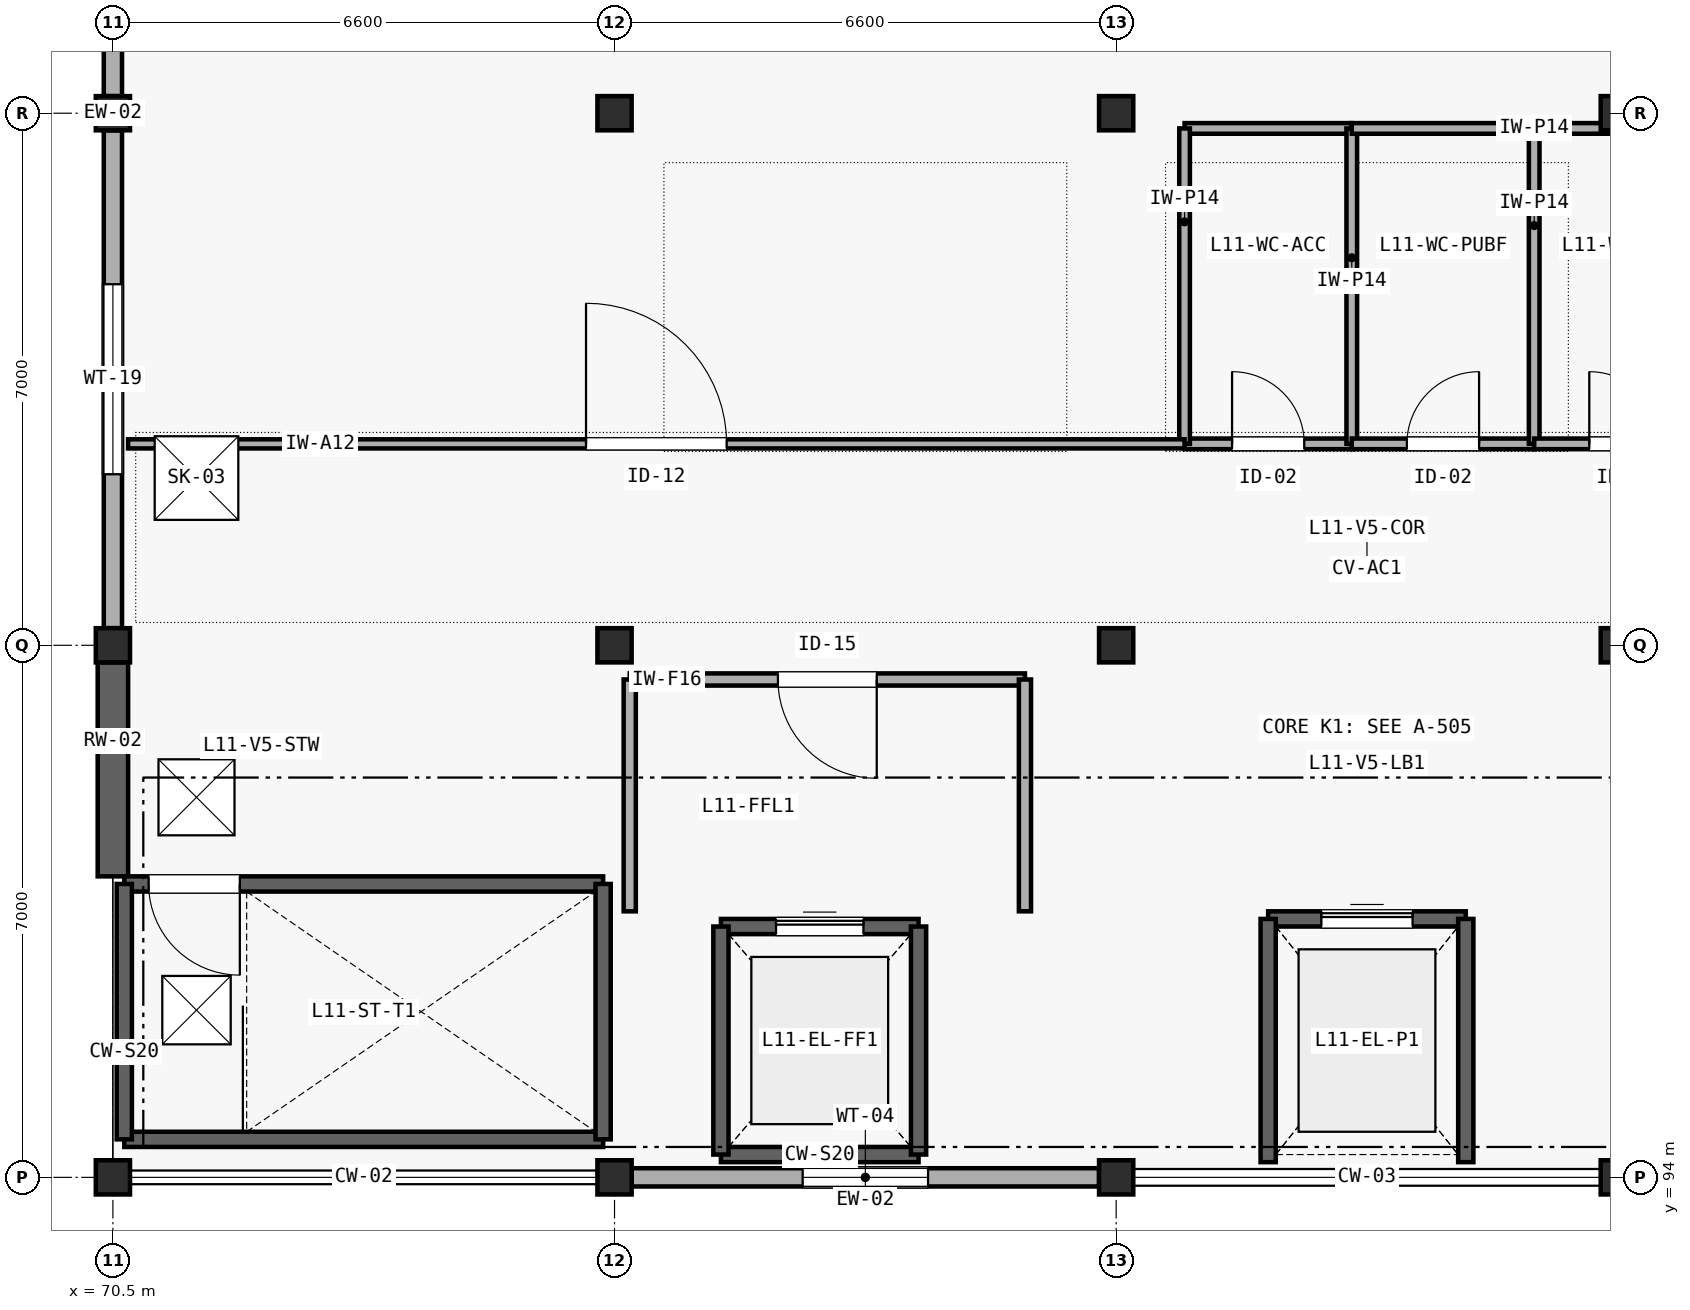
"""IFC4 building model, lengths in metres.
Left out: names, types, materials, properties, quantities, classifications, styles, units other than length and angle.
Written with IfcOpenShell. Run it as: python <this file> out.ifc"""

import sys

from ifc_helpers import new_model, si_unit, direction, frame, frame_2d, origin, origin_2d, place, context, subcontext, project, spatial, rectangle, extrude, element, fill, save


model = new_model("IFC4")
c1 = context("Model", 3, precision=1e-05, world=origin(), true_north=direction((0.0, 1.0)))
c2 = subcontext(c1, "Body", "Model", "MODEL_VIEW")
j1 = project(units=[si_unit("LENGTHUNIT", "METRE"), si_unit("PLANEANGLEUNIT", "RADIAN")], contexts=[c1])
p1 = place(None, origin())
s1 = spatial("IfcSite", under=j1, at=p1, CompositionType="ELEMENT")
p2 = place(p1, origin())
s2 = spatial("IfcBuilding", under=s1, at=p2, CompositionType="ELEMENT")
p3 = place(p2, frame((0.0, 0.0, 46.2)))
s3 = spatial("IfcBuildingStorey", under=s2, at=p3, CompositionType="ELEMENT", Elevation=46.2)
for number, where, z_axis, x_axis in (
    (1, (70.5, 94.0, 0.0), (0.0, 0.0, 1.0), (1.0, 0.0, 0.0)),
    (2, (70.5, 101.0, 0.0), (0.0, 0.0, 1.0), (1.0, 0.0, 0.0)),
    (3, (70.5, 108.0, 0.0), (0.0, 0.0, 1.0), (1.0, 0.0, 0.0)),
    (4, (77.1, 94.0, 0.0), (0.0, 0.0, 1.0), (1.0, 0.0, 0.0)),
    (5, (77.1, 101.0, 0.0), (0.0, 0.0, 1.0), (1.0, 0.0, 0.0)),
    (6, (77.1, 108.0, 0.0), (0.0, 0.0, 1.0), (1.0, 0.0, 0.0)),
    (7, (83.7, 94.0, 0.0), (0.0, 0.0, 1.0), (1.0, 0.0, 0.0)),
    (8, (83.7, 101.0, 0.0), (0.0, 0.0, 1.0), (1.0, 0.0, 0.0)),
    (9, (83.7, 108.0, 0.0), (0.0, 0.0, 1.0), (1.0, 0.0, 0.0)),
    (10, (90.3, 94.0, 0.0), (0.0, 0.0, 1.0), (1.0, 0.0, 0.0)),
    (11, (90.3, 101.0, 0.0), (0.0, 0.0, 1.0), (1.0, 0.0, 0.0)),
    (12, (90.3, 108.0, 0.0), (0.0, 0.0, 1.0), (1.0, 0.0, 0.0)),
):
    element("IfcColumn", number, at=place(p3, frame(where, z_axis=z_axis, x_axis=x_axis)), inside=s3, PredefinedType="COLUMN", context=c2, shape_type="SweptSolid", body=[
        extrude(rectangle(XDim=0.45, YDim=0.45, at=origin_2d()), origin(), (0.0, 0.0, 1.0), 4.2),
    ])
p4 = place(p3, frame((77.325, 94.0, 0.0), z_axis=(0.0, 0.0, 1.0), x_axis=(1.0, 0.0, 0.0)))
e13 = element("IfcWall", 13, at=p4, inside=s3, PredefinedType="SOLIDWALL", context=c2, shape_type="SweptSolid", body=[
    extrude(rectangle(XDim=6.15, YDim=0.24, at=frame_2d((3.075, 0.0))), origin(), (0.0, 0.0, 1.0), 3.345),
])
p5 = place(p4, frame((2.25, 0.0, 0.85)))
e14 = element("IfcOpeningElement", 14, at=p5, cuts=e13, PredefinedType="OPENING", context=c2, shape_type="SweptSolid", body=[
    extrude(rectangle(XDim=1.65, YDim=1.35, at=frame_2d((0.825, 0.675))), frame((0.0, 0.13, 0.0), z_axis=(0.0, -1.0, 0.0), x_axis=(1.0, 0.0, 0.0)), (0.0, 0.0, 1.0), 0.26),
])
p6 = place(p3, frame((70.5, 97.96, 0.0), z_axis=(0.0, 0.0, 1.0), x_axis=(0.0, 1.0, 0.0)))
e15 = element("IfcWall", 15, at=p6, inside=s3, PredefinedType="SHEAR", context=c2, shape_type="SweptSolid", body=[
    extrude(rectangle(XDim=2.815, YDim=0.4, at=frame_2d((1.407, 0.0))), origin(), (0.0, 0.0, 1.0), 3.85),
])
p7 = place(p3, frame((70.5, 101.225, 0.0), z_axis=(0.0, 0.0, 1.0), x_axis=(0.0, 1.0, 0.0)))
e16 = element("IfcWall", 16, at=p7, inside=s3, PredefinedType="SOLIDWALL", context=c2, shape_type="SweptSolid", body=[
    extrude(rectangle(XDim=6.55, YDim=0.24, at=frame_2d((3.275, 0.0))), origin(), (0.0, 0.0, 1.0), 3.313),
])
p8 = place(p7, frame((2.025, 0.0, 0.85)))
e17 = element("IfcOpeningElement", 17, at=p8, cuts=e16, PredefinedType="OPENING", context=c2, shape_type="SweptSolid", body=[
    extrude(rectangle(XDim=2.5, YDim=1.25, at=frame_2d((1.25, 0.625))), frame((0.0, 0.13, 0.0), z_axis=(0.0, -1.0, 0.0), x_axis=(1.0, 0.0, 0.0)), (0.0, 0.0, 1.0), 0.26),
])
p9 = place(p3, frame((70.5, 108.225, 0.0), z_axis=(0.0, 0.0, 1.0), x_axis=(0.0, 1.0, 0.0)))
e18 = element("IfcWall", 18, at=p9, inside=s3, PredefinedType="SOLIDWALL", context=c2, shape_type="SweptSolid", body=[
    extrude(rectangle(XDim=6.55, YDim=0.24, at=frame_2d((3.275, 0.0))), origin(), (0.0, 0.0, 1.0), 3.381),
])
p10 = place(p9, frame((2.375, 0.0, 0.85)))
e19 = element("IfcOpeningElement", 19, at=p10, cuts=e18, PredefinedType="OPENING", context=c2, shape_type="SweptSolid", body=[
    extrude(rectangle(XDim=1.8, YDim=1.6, at=frame_2d((0.9, 0.8))), frame((0.0, 0.13, 0.0), z_axis=(0.0, -1.0, 0.0), x_axis=(1.0, 0.0, 0.0)), (0.0, 0.0, 1.0), 0.26),
])
p11 = place(p3, frame((70.65, 94.5, 0.0), z_axis=(0.0, 0.0, 1.0), x_axis=(1.0, 0.0, 0.0)))
e20 = element("IfcWall", 20, at=p11, inside=s3, PredefinedType="SHEAR", context=c2, shape_type="SweptSolid", body=[
    extrude(rectangle(XDim=6.3, YDim=0.2, at=frame_2d((3.15, 0.0))), origin(), (0.0, 0.0, 1.0), 4.2),
])
p12 = place(p3, frame((70.65, 97.86, 0.0), z_axis=(0.0, 0.0, 1.0), x_axis=(1.0, 0.0, 0.0)))
e21 = element("IfcWall", 21, at=p12, inside=s3, PredefinedType="SHEAR", context=c2, shape_type="SweptSolid", body=[
    extrude(rectangle(XDim=6.3, YDim=0.2, at=frame_2d((3.15, 0.0))), origin(), (0.0, 0.0, 1.0), 4.2),
])
p13 = place(p12, frame((0.32, 0.0, 0.0)))
e22 = element("IfcOpeningElement", 22, at=p13, cuts=e21, PredefinedType="OPENING", context=c2, shape_type="SweptSolid", body=[
    extrude(rectangle(XDim=1.2, YDim=2.15, at=frame_2d((0.6, 1.075))), frame((0.0, 0.11, 0.0), z_axis=(0.0, -1.0, 0.0), x_axis=(1.0, 0.0, 0.0)), (0.0, 0.0, 1.0), 0.22),
])
for number, where, z_axis, x_axis in (
    (23, (70.65, 94.5, 0.0), (0.0, 0.0, 1.0), (0.0, 1.0, 0.0)),
    (24, (76.95, 94.5, 0.0), (0.0, 0.0, 1.0), (0.0, 1.0, 0.0)),
):
    element("IfcWall", number, at=place(p3, frame(where, z_axis=z_axis, x_axis=x_axis)), inside=s3, PredefinedType="SHEAR", context=c2, shape_type="SweptSolid", body=[
        extrude(rectangle(XDim=3.36, YDim=0.2, at=frame_2d((1.68, 0.0))), origin(), (0.0, 0.0, 1.0), 4.2),
    ])
p14 = place(p3, frame((78.5, 94.3, 0.0), z_axis=(0.0, 0.0, 1.0), x_axis=(1.0, 0.0, 0.0)))
e25 = element("IfcWall", 25, at=p14, inside=s3, PredefinedType="SHEAR", context=c2, shape_type="SweptSolid", body=[
    extrude(rectangle(XDim=2.6, YDim=0.2, at=frame_2d((1.3, 0.0))), origin(), (0.0, 0.0, 1.0), 4.2),
])
p15 = place(p3, frame((78.5, 97.3, 0.0), z_axis=(0.0, 0.0, 1.0), x_axis=(1.0, 0.0, 0.0)))
e26 = element("IfcWall", 26, at=p15, inside=s3, PredefinedType="SHEAR", context=c2, shape_type="SweptSolid", body=[
    extrude(rectangle(XDim=2.6, YDim=0.2, at=frame_2d((1.3, 0.0))), origin(), (0.0, 0.0, 1.0), 4.2),
])
p16 = place(p15, frame((0.725, 0.0, 0.0)))
e27 = element("IfcOpeningElement", 27, at=p16, cuts=e26, PredefinedType="OPENING", context=c2, shape_type="SweptSolid", body=[
    extrude(rectangle(XDim=1.15, YDim=2.2, at=frame_2d((0.575, 1.1))), frame((0.0, 0.11, 0.0), z_axis=(0.0, -1.0, 0.0), x_axis=(1.0, 0.0, 0.0)), (0.0, 0.0, 1.0), 0.22),
])
for number, where, z_axis, x_axis in (
    (28, (78.5, 94.3, 0.0), (0.0, 0.0, 1.0), (0.0, 1.0, 0.0)),
    (29, (81.1, 94.3, 0.0), (0.0, 0.0, 1.0), (0.0, 1.0, 0.0)),
):
    element("IfcWall", number, at=place(p3, frame(where, z_axis=z_axis, x_axis=x_axis)), inside=s3, PredefinedType="SHEAR", context=c2, shape_type="SweptSolid", body=[
        extrude(rectangle(XDim=3.0, YDim=0.2, at=frame_2d((1.5, 0.0))), origin(), (0.0, 0.0, 1.0), 4.2),
    ])
p17 = place(p3, frame((85.7, 97.4, 0.0), z_axis=(0.0, 0.0, 1.0), x_axis=(1.0, 0.0, 0.0)))
e30 = element("IfcWall", 30, at=p17, inside=s3, PredefinedType="SHEAR", context=c2, shape_type="SweptSolid", body=[
    extrude(rectangle(XDim=2.6, YDim=0.2, at=frame_2d((1.3, 0.0))), origin(), (0.0, 0.0, 1.0), 4.2),
])
p18 = place(p17, frame((0.7, 0.0, 0.0)))
e31 = element("IfcOpeningElement", 31, at=p18, cuts=e30, PredefinedType="OPENING", context=c2, shape_type="SweptSolid", body=[
    extrude(rectangle(XDim=1.2, YDim=2.2, at=frame_2d((0.6, 1.1))), frame((0.0, 0.11, 0.0), z_axis=(0.0, -1.0, 0.0), x_axis=(1.0, 0.0, 0.0)), (0.0, 0.0, 1.0), 0.22),
])
for number, where, z_axis, x_axis in (
    (32, (85.7, 94.2, 0.0), (0.0, 0.0, 1.0), (0.0, 1.0, 0.0)),
    (33, (88.3, 94.2, 0.0), (0.0, 0.0, 1.0), (0.0, 1.0, 0.0)),
):
    element("IfcWall", number, at=place(p3, frame(where, z_axis=z_axis, x_axis=x_axis)), inside=s3, PredefinedType="SHEAR", context=c2, shape_type="SweptSolid", body=[
        extrude(rectangle(XDim=3.2, YDim=0.2, at=frame_2d((1.6, 0.0))), origin(), (0.0, 0.0, 1.0), 4.2),
    ])
p19 = place(p3, frame((77.3, 100.55, 0.0), z_axis=(0.0, 0.0, 1.0), x_axis=(1.0, 0.0, 0.0)))
e34 = element("IfcWall", 34, at=p19, inside=s3, PredefinedType="SOLIDWALL", context=c2, shape_type="SweptSolid", body=[
    extrude(rectangle(XDim=5.2, YDim=0.16, at=frame_2d((2.6, 0.0))), origin(), (0.0, 0.0, 1.0), 3.9),
])
p20 = place(p19, frame((1.95, 0.0, 0.0)))
e35 = element("IfcOpeningElement", 35, at=p20, cuts=e34, PredefinedType="OPENING", context=c2, shape_type="SweptSolid", body=[
    extrude(rectangle(XDim=1.3, YDim=2.15, at=frame_2d((0.65, 1.075))), frame((0.0, 0.09, 0.0), z_axis=(0.0, -1.0, 0.0), x_axis=(1.0, 0.0, 0.0)), (0.0, 0.0, 1.0), 0.18),
])
p21 = place(p3, frame((77.3, 97.5, 0.0), z_axis=(0.0, 0.0, 1.0), x_axis=(0.0, 1.0, 0.0)))
e36 = element("IfcWall", 36, at=p21, inside=s3, PredefinedType="SOLIDWALL", context=c2, shape_type="SweptSolid", body=[
    extrude(rectangle(XDim=3.05, YDim=0.16, at=frame_2d((1.525, 0.0))), origin(), (0.0, 0.0, 1.0), 3.405),
])
p22 = place(p3, frame((82.5, 97.5, 0.0), z_axis=(0.0, 0.0, 1.0), x_axis=(0.0, 1.0, 0.0)))
e37 = element("IfcWall", 37, at=p22, inside=s3, PredefinedType="SOLIDWALL", context=c2, shape_type="SweptSolid", body=[
    extrude(rectangle(XDim=3.05, YDim=0.16, at=frame_2d((1.525, 0.0))), origin(), (0.0, 0.0, 1.0), 3.9),
])
p23 = place(p3, frame((84.6, 103.65, 0.0), z_axis=(0.0, 0.0, 1.0), x_axis=(1.0, 0.0, 0.0)))
e38 = element("IfcWall", 38, at=p23, inside=s3, PredefinedType="PLUMBINGWALL", context=c2, shape_type="SweptSolid", body=[
    extrude(rectangle(XDim=2.2, YDim=0.14, at=frame_2d((1.1, 0.0))), origin(), (0.0, 0.0, 1.0), 3.9),
])
p24 = place(p23, frame((0.625, 0.0, 0.0)))
e39 = element("IfcOpeningElement", 39, at=p24, cuts=e38, PredefinedType="OPENING", context=c2, shape_type="SweptSolid", body=[
    extrude(rectangle(XDim=0.95, YDim=2.1, at=frame_2d((0.475, 1.05))), frame((0.0, 0.08, 0.0), z_axis=(0.0, -1.0, 0.0), x_axis=(1.0, 0.0, 0.0)), (0.0, 0.0, 1.0), 0.16),
])
p25 = place(p3, frame((84.6, 107.8, 0.0), z_axis=(0.0, 0.0, 1.0), x_axis=(1.0, 0.0, 0.0)))
e40 = element("IfcWall", 40, at=p25, inside=s3, PredefinedType="PLUMBINGWALL", context=c2, shape_type="SweptSolid", body=[
    extrude(rectangle(XDim=2.2, YDim=0.14, at=frame_2d((1.1, 0.0))), origin(), (0.0, 0.0, 1.0), 3.135),
])
for number, where, z_axis, x_axis in (
    (41, (84.6, 103.65, 0.0), (0.0, 0.0, 1.0), (0.0, 1.0, 0.0)),
    (42, (86.8, 103.65, 0.0), (0.0, 0.0, 1.0), (0.0, 1.0, 0.0)),
):
    element("IfcWall", number, at=place(p3, frame(where, z_axis=z_axis, x_axis=x_axis)), inside=s3, PredefinedType="PLUMBINGWALL", context=c2, shape_type="SweptSolid", body=[
        extrude(rectangle(XDim=4.15, YDim=0.14, at=frame_2d((2.075, 0.0))), origin(), (0.0, 0.0, 1.0), 3.9),
    ])
p26 = place(p3, frame((86.8, 103.65, 0.0), z_axis=(0.0, 0.0, 1.0), x_axis=(1.0, 0.0, 0.0)))
e43 = element("IfcWall", 43, at=p26, inside=s3, PredefinedType="PLUMBINGWALL", context=c2, shape_type="SweptSolid", body=[
    extrude(rectangle(XDim=2.4, YDim=0.14, at=frame_2d((1.2, 0.0))), origin(), (0.0, 0.0, 1.0), 3.9),
])
p27 = place(p26, frame((0.725, 0.0, 0.0)))
e44 = element("IfcOpeningElement", 44, at=p27, cuts=e43, PredefinedType="OPENING", context=c2, shape_type="SweptSolid", body=[
    extrude(rectangle(XDim=0.95, YDim=2.1, at=frame_2d((0.475, 1.05))), frame((0.0, 0.08, 0.0), z_axis=(0.0, -1.0, 0.0), x_axis=(1.0, 0.0, 0.0)), (0.0, 0.0, 1.0), 0.16),
])
p28 = place(p3, frame((86.8, 107.8, 0.0), z_axis=(0.0, 0.0, 1.0), x_axis=(1.0, 0.0, 0.0)))
e45 = element("IfcWall", 45, at=p28, inside=s3, PredefinedType="PLUMBINGWALL", context=c2, shape_type="SweptSolid", body=[
    extrude(rectangle(XDim=2.4, YDim=0.14, at=frame_2d((1.2, 0.0))), origin(), (0.0, 0.0, 1.0), 3.135),
])
p29 = place(p3, frame((89.2, 103.65, 0.0), z_axis=(0.0, 0.0, 1.0), x_axis=(0.0, 1.0, 0.0)))
e46 = element("IfcWall", 46, at=p29, inside=s3, PredefinedType="PLUMBINGWALL", context=c2, shape_type="SweptSolid", body=[
    extrude(rectangle(XDim=4.15, YDim=0.14, at=frame_2d((2.075, 0.0))), origin(), (0.0, 0.0, 1.0), 3.9),
])
p30 = place(p3, frame((89.2, 103.65, 0.0), z_axis=(0.0, 0.0, 1.0), x_axis=(1.0, 0.0, 0.0)))
e47 = element("IfcWall", 47, at=p30, inside=s3, PredefinedType="PLUMBINGWALL", context=c2, shape_type="SweptSolid", body=[
    extrude(rectangle(XDim=2.4, YDim=0.14, at=frame_2d((1.2, 0.0))), origin(), (0.0, 0.0, 1.0), 3.9),
])
p31 = place(p30, frame((0.725, 0.0, 0.0)))
e48 = element("IfcOpeningElement", 48, at=p31, cuts=e47, PredefinedType="OPENING", context=c2, shape_type="SweptSolid", body=[
    extrude(rectangle(XDim=0.95, YDim=2.1, at=frame_2d((0.475, 1.05))), frame((0.0, 0.08, 0.0), z_axis=(0.0, -1.0, 0.0), x_axis=(1.0, 0.0, 0.0)), (0.0, 0.0, 1.0), 0.16),
])
p32 = place(p3, frame((89.2, 107.8, 0.0), z_axis=(0.0, 0.0, 1.0), x_axis=(1.0, 0.0, 0.0)))
e49 = element("IfcWall", 49, at=p32, inside=s3, PredefinedType="PLUMBINGWALL", context=c2, shape_type="SweptSolid", body=[
    extrude(rectangle(XDim=2.4, YDim=0.14, at=frame_2d((1.2, 0.0))), origin(), (0.0, 0.0, 1.0), 3.135),
])
p33 = place(p3, frame((70.7, 103.65, 0.0), z_axis=(0.0, 0.0, 1.0), x_axis=(1.0, 0.0, 0.0)))
e50 = element("IfcWall", 50, at=p33, inside=s3, PredefinedType="PARTITIONING", context=c2, shape_type="SweptSolid", body=[
    extrude(rectangle(XDim=13.9, YDim=0.12, at=frame_2d((6.95, 0.0))), origin(), (0.0, 0.0, 1.0), 3.9),
])
p34 = place(p33, frame((6.025, 0.0, 0.0)))
e51 = element("IfcOpeningElement", 51, at=p34, cuts=e50, PredefinedType="OPENING", context=c2, shape_type="SweptSolid", body=[
    extrude(rectangle(XDim=1.85, YDim=2.3, at=frame_2d((0.925, 1.15))), frame((0.0, 0.07, 0.0), z_axis=(0.0, -1.0, 0.0), x_axis=(1.0, 0.0, 0.0)), (0.0, 0.0, 1.0), 0.14),
])
p35 = place(p5, origin())
e52 = element("IfcWindow", 52, at=p35, inside=s3, PartitioningType="SINGLE_PANEL", PredefinedType="WINDOW", context=c2, shape_type="SweptSolid", body=[
    extrude(rectangle(XDim=1.65, YDim=1.35, at=frame_2d((0.825, 0.675))), frame((0.0, 0.03, 0.0), z_axis=(0.0, -1.0, 0.0), x_axis=(1.0, 0.0, 0.0)), (0.0, 0.0, 1.0), 0.06),
])
fill(e14, e52)
p36 = place(p8, origin())
e53 = element("IfcWindow", 53, at=p36, inside=s3, PartitioningType="SINGLE_PANEL", PredefinedType="WINDOW", context=c2, shape_type="SweptSolid", body=[
    extrude(rectangle(XDim=2.5, YDim=1.25, at=frame_2d((1.25, 0.625))), frame((0.0, 0.03, 0.0), z_axis=(0.0, -1.0, 0.0), x_axis=(1.0, 0.0, 0.0)), (0.0, 0.0, 1.0), 0.06),
])
fill(e17, e53)
p37 = place(p2, frame((0.0, 0.0, 50.4)))
p38 = place(p37, frame((0.0, 0.0, -0.26)))
p39 = place(p38, frame((71.6, 96.2, 0.21)))
e54 = element("IfcWindow", 54, at=p39, inside=s3, PartitioningType="SINGLE_PANEL", PredefinedType="SKYLIGHT", context=c2, shape_type="SweptSolid", body=[
    extrude(rectangle(XDim=0.9, YDim=0.9, at=origin_2d()), origin(), (0.0, 0.0, 1.0), 0.05),
])
p40 = place(p38, frame((71.6, 99.0, 0.21)))
e55 = element("IfcWindow", 55, at=p40, inside=s3, PartitioningType="SINGLE_PANEL", PredefinedType="SKYLIGHT", context=c2, shape_type="SweptSolid", body=[
    extrude(rectangle(XDim=1.0, YDim=1.0, at=origin_2d()), origin(), (0.0, 0.0, 1.0), 0.05),
])
p41 = place(p38, frame((71.6, 103.2, 0.21)))
e56 = element("IfcWindow", 56, at=p41, inside=s3, PartitioningType="SINGLE_PANEL", PredefinedType="SKYLIGHT", context=c2, shape_type="SweptSolid", body=[
    extrude(rectangle(XDim=1.1, YDim=1.1, at=origin_2d()), origin(), (0.0, 0.0, 1.0), 0.05),
])
p42 = place(p13, frame((1.2, 0.0, 0.0), z_axis=(0.0, 0.0, 1.0), x_axis=(-1.0, 0.0, 0.0)))
e57 = element("IfcDoor", 57, at=p42, inside=s3, OperationType="SINGLE_SWING_LEFT", PredefinedType="DOOR", context=c2, shape_type="SweptSolid", body=[
    extrude(rectangle(XDim=1.2, YDim=2.15, at=frame_2d((0.6, 1.075))), frame((0.0, 0.025, 0.0), z_axis=(0.0, -1.0, 0.0), x_axis=(1.0, 0.0, 0.0)), (0.0, 0.0, 1.0), 0.05),
])
fill(e22, e57)
p43 = place(p16, origin())
e58 = element("IfcDoor", 58, at=p43, inside=s3, OperationType="SLIDING_TO_LEFT", PredefinedType="DOOR", context=c2, shape_type="SweptSolid", body=[
    extrude(rectangle(XDim=1.15, YDim=2.2, at=frame_2d((0.575, 1.1))), frame((0.0, 0.025, 0.0), z_axis=(0.0, -1.0, 0.0), x_axis=(1.0, 0.0, 0.0)), (0.0, 0.0, 1.0), 0.05),
])
fill(e27, e58)
p44 = place(p18, origin())
e59 = element("IfcDoor", 59, at=p44, inside=s3, OperationType="SLIDING_TO_LEFT", PredefinedType="DOOR", context=c2, shape_type="SweptSolid", body=[
    extrude(rectangle(XDim=1.2, YDim=2.2, at=frame_2d((0.6, 1.1))), frame((0.0, 0.025, 0.0), z_axis=(0.0, -1.0, 0.0), x_axis=(1.0, 0.0, 0.0)), (0.0, 0.0, 1.0), 0.05),
])
fill(e31, e59)
p45 = place(p20, frame((1.3, 0.0, 0.0), z_axis=(0.0, 0.0, 1.0), x_axis=(-1.0, 0.0, 0.0)))
e60 = element("IfcDoor", 60, at=p45, inside=s3, OperationType="SINGLE_SWING_LEFT", PredefinedType="DOOR", context=c2, shape_type="SweptSolid", body=[
    extrude(rectangle(XDim=1.3, YDim=2.15, at=frame_2d((0.65, 1.075))), frame((0.0, 0.025, 0.0), z_axis=(0.0, -1.0, 0.0), x_axis=(1.0, 0.0, 0.0)), (0.0, 0.0, 1.0), 0.05),
])
fill(e35, e60)
p46 = place(p24, origin())
e61 = element("IfcDoor", 61, at=p46, inside=s3, OperationType="SINGLE_SWING_LEFT", PredefinedType="DOOR", context=c2, shape_type="SweptSolid", body=[
    extrude(rectangle(XDim=0.95, YDim=2.1, at=frame_2d((0.475, 1.05))), frame((0.0, 0.025, 0.0), z_axis=(0.0, -1.0, 0.0), x_axis=(1.0, 0.0, 0.0)), (0.0, 0.0, 1.0), 0.05),
])
fill(e39, e61)
p47 = place(p27, origin())
e62 = element("IfcDoor", 62, at=p47, inside=s3, OperationType="SINGLE_SWING_RIGHT", PredefinedType="DOOR", context=c2, shape_type="SweptSolid", body=[
    extrude(rectangle(XDim=0.95, YDim=2.1, at=frame_2d((0.475, 1.05))), frame((0.0, 0.025, 0.0), z_axis=(0.0, -1.0, 0.0), x_axis=(1.0, 0.0, 0.0)), (0.0, 0.0, 1.0), 0.05),
])
fill(e44, e62)
p48 = place(p31, origin())
e63 = element("IfcDoor", 63, at=p48, inside=s3, OperationType="SINGLE_SWING_LEFT", PredefinedType="DOOR", context=c2, shape_type="SweptSolid", body=[
    extrude(rectangle(XDim=0.95, YDim=2.1, at=frame_2d((0.475, 1.05))), frame((0.0, 0.025, 0.0), z_axis=(0.0, -1.0, 0.0), x_axis=(1.0, 0.0, 0.0)), (0.0, 0.0, 1.0), 0.05),
])
fill(e48, e63)
p49 = place(p34, origin())
e64 = element("IfcDoor", 64, at=p49, inside=s3, OperationType="SINGLE_SWING_LEFT", PredefinedType="DOOR", context=c2, shape_type="SweptSolid", body=[
    extrude(rectangle(XDim=1.85, YDim=2.3, at=frame_2d((0.925, 1.15))), frame((0.0, 0.025, 0.0), z_axis=(0.0, -1.0, 0.0), x_axis=(1.0, 0.0, 0.0)), (0.0, 0.0, 1.0), 0.05),
])
fill(e51, e64)
save(model, sys.argv[1])
